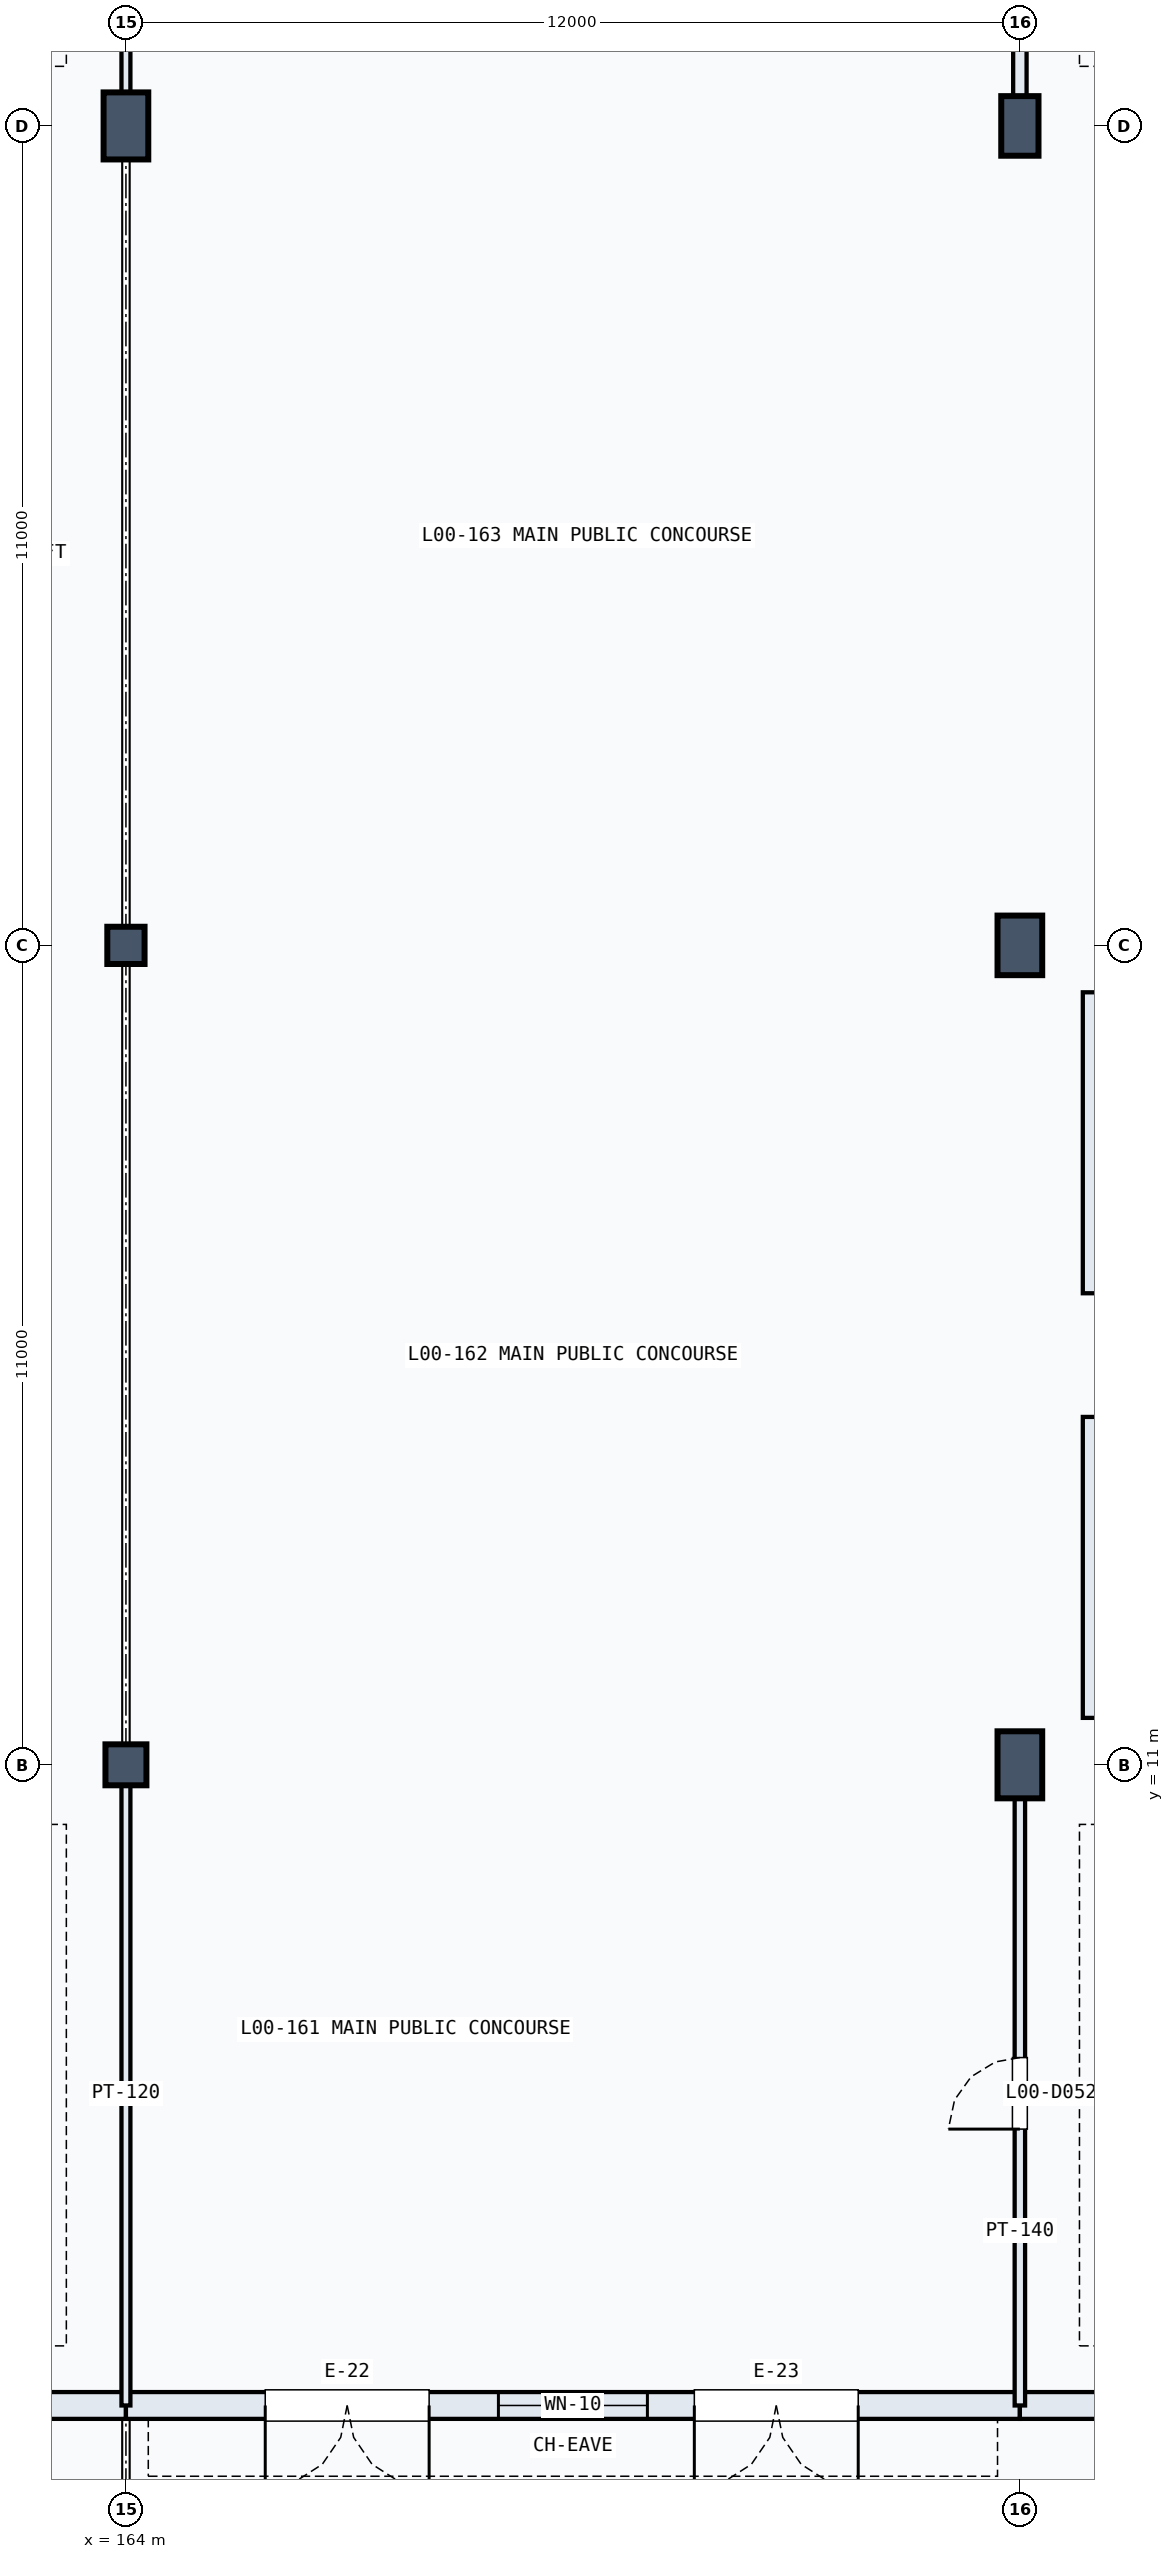
"""IFC4 building model, lengths in metres.
Left out: names, types, materials, properties, quantities, classifications, styles, units other than length and angle.
Written with IfcOpenShell. Run it as: python <this file> out.ifc"""

import sys

from ifc_helpers import new_model, si_unit, direction, frame, frame_2d, origin, origin_2d, place, context, subcontext, project, spatial, rectangle, extrude, element, fill, save


model = new_model("IFC4")
c1 = context("Model", 3, precision=1e-05, world=origin(), true_north=direction((0.0, 1.0)))
c2 = subcontext(c1, "Body", "Model", "MODEL_VIEW")
j1 = project(units=[si_unit("LENGTHUNIT", "METRE"), si_unit("PLANEANGLEUNIT", "RADIAN")], contexts=[c1])
p1 = place(None, origin())
s1 = spatial("IfcSite", under=j1, at=p1, CompositionType="ELEMENT")
p2 = place(p1, origin())
s2 = spatial("IfcBuilding", under=s1, at=p2, CompositionType="ELEMENT")
p3 = place(p2, origin())
s3 = spatial("IfcBuildingStorey", under=s2, at=p3, CompositionType="ELEMENT", Elevation=0.0)
p4 = place(p3, frame((164.0, 11.0, 0.0), z_axis=(0.0, 0.0, 1.0), x_axis=(1.0, 0.0, 0.0)))
e1 = element("IfcColumn", 1, at=p4, inside=s3, PredefinedType="COLUMN", context=c2, shape_type="SweptSolid", body=[
    extrude(rectangle(XDim=0.55, YDim=0.55, at=origin_2d()), origin(), (0.0, 0.0, 1.0), 5.4),
])
p5 = place(p3, frame((164.0, 22.0, 0.0), z_axis=(0.0, 0.0, 1.0), x_axis=(1.0, 0.0, 0.0)))
e2 = element("IfcColumn", 2, at=p5, inside=s3, PredefinedType="COLUMN", context=c2, shape_type="SweptSolid", body=[
    extrude(rectangle(XDim=0.5, YDim=0.5, at=origin_2d()), origin(), (0.0, 0.0, 1.0), 5.4),
])
for number, where, z_axis, x_axis in (
    (3, (164.0, 33.0, 0.0), (0.0, 0.0, 1.0), (1.0, 0.0, 0.0)),
    (4, (176.0, 11.0, 0.0), (0.0, 0.0, 1.0), (1.0, 0.0, 0.0)),
):
    element("IfcColumn", number, at=place(p3, frame(where, z_axis=z_axis, x_axis=x_axis)), inside=s3, PredefinedType="COLUMN", context=c2, shape_type="SweptSolid", body=[
        extrude(rectangle(XDim=0.6, YDim=0.9, at=origin_2d()), origin(), (0.0, 0.0, 1.0), 5.4),
    ])
p6 = place(p3, frame((176.0, 22.0, 0.0), z_axis=(0.0, 0.0, 1.0), x_axis=(1.0, 0.0, 0.0)))
e5 = element("IfcColumn", 5, at=p6, inside=s3, PredefinedType="COLUMN", context=c2, shape_type="SweptSolid", body=[
    extrude(rectangle(XDim=0.6, YDim=0.8, at=origin_2d()), origin(), (0.0, 0.0, 1.0), 5.4),
])
p7 = place(p3, frame((176.0, 33.0, 0.0), z_axis=(0.0, 0.0, 1.0), x_axis=(1.0, 0.0, 0.0)))
e6 = element("IfcColumn", 6, at=p7, inside=s3, PredefinedType="COLUMN", context=c2, shape_type="SweptSolid", body=[
    extrude(rectangle(XDim=0.5, YDim=0.8, at=origin_2d()), origin(), (0.0, 0.0, 1.0), 5.4),
])
p8 = place(p3, frame((152.0, 2.4, 0.0), z_axis=(0.0, 0.0, 1.0), x_axis=(1.0, 0.0, 0.0)))
e7 = element("IfcWall", 7, at=p8, inside=s3, PredefinedType="SOLIDWALL", context=c2, shape_type="SweptSolid", body=[
    extrude(rectangle(XDim=12.0, YDim=0.36, at=frame_2d((6.0, 0.0))), origin(), (0.0, 0.0, 1.0), 4.35),
])
p9 = place(p8, frame((1.87, 0.0, 0.0)))
e8 = element("IfcOpeningElement", 8, at=p9, cuts=e7, PredefinedType="OPENING", context=c2, shape_type="SweptSolid", body=[
    extrude(rectangle(XDim=2.2, YDim=2.35, at=frame_2d((1.1, 1.175))), frame((0.0, 0.19, 0.0), z_axis=(0.0, -1.0, 0.0), x_axis=(1.0, 0.0, 0.0)), (0.0, 0.0, 1.0), 0.38),
])
p10 = place(p8, frame((7.63, 0.0, 0.0)))
e9 = element("IfcOpeningElement", 9, at=p10, cuts=e7, PredefinedType="OPENING", context=c2, shape_type="SweptSolid", body=[
    extrude(rectangle(XDim=2.2, YDim=2.35, at=frame_2d((1.1, 1.175))), frame((0.0, 0.19, 0.0), z_axis=(0.0, -1.0, 0.0), x_axis=(1.0, 0.0, 0.0)), (0.0, 0.0, 1.0), 0.38),
])
p11 = place(p8, frame((5.55, 0.0, 0.8)))
e10 = element("IfcOpeningElement", 10, at=p11, cuts=e7, PredefinedType="OPENING", context=c2, shape_type="SweptSolid", body=[
    extrude(rectangle(XDim=0.9, YDim=1.8, at=frame_2d((0.45, 0.9))), frame((0.0, 0.19, 0.0), z_axis=(0.0, -1.0, 0.0), x_axis=(1.0, 0.0, 0.0)), (0.0, 0.0, 1.0), 0.38),
])
p12 = place(p3, frame((164.0, 2.4, 0.0), z_axis=(0.0, 0.0, 1.0), x_axis=(1.0, 0.0, 0.0)))
e11 = element("IfcWall", 11, at=p12, inside=s3, PredefinedType="SOLIDWALL", context=c2, shape_type="SweptSolid", body=[
    extrude(rectangle(XDim=12.0, YDim=0.36, at=frame_2d((6.0, 0.0))), origin(), (0.0, 0.0, 1.0), 4.43),
])
p13 = place(p12, frame((1.87, 0.0, 0.0)))
e12 = element("IfcOpeningElement", 12, at=p13, cuts=e11, PredefinedType="OPENING", context=c2, shape_type="SweptSolid", body=[
    extrude(rectangle(XDim=2.2, YDim=2.35, at=frame_2d((1.1, 1.175))), frame((0.0, 0.19, 0.0), z_axis=(0.0, -1.0, 0.0), x_axis=(1.0, 0.0, 0.0)), (0.0, 0.0, 1.0), 0.38),
])
p14 = place(p12, frame((7.63, 0.0, 0.0)))
e13 = element("IfcOpeningElement", 13, at=p14, cuts=e11, PredefinedType="OPENING", context=c2, shape_type="SweptSolid", body=[
    extrude(rectangle(XDim=2.2, YDim=2.35, at=frame_2d((1.1, 1.175))), frame((0.0, 0.19, 0.0), z_axis=(0.0, -1.0, 0.0), x_axis=(1.0, 0.0, 0.0)), (0.0, 0.0, 1.0), 0.38),
])
p15 = place(p12, frame((5.0, 0.0, 0.9)))
e14 = element("IfcOpeningElement", 14, at=p15, cuts=e11, PredefinedType="OPENING", context=c2, shape_type="SweptSolid", body=[
    extrude(rectangle(XDim=2.0, YDim=1.65, at=frame_2d((1.0, 0.825))), frame((0.0, 0.19, 0.0), z_axis=(0.0, -1.0, 0.0), x_axis=(1.0, 0.0, 0.0)), (0.0, 0.0, 1.0), 0.38),
])
p16 = place(p3, frame((176.0, 2.4, 0.0), z_axis=(0.0, 0.0, 1.0), x_axis=(1.0, 0.0, 0.0)))
e15 = element("IfcWall", 15, at=p16, inside=s3, PredefinedType="SOLIDWALL", context=c2, shape_type="SweptSolid", body=[
    extrude(rectangle(XDim=11.0, YDim=0.36, at=frame_2d((5.5, 0.0))), origin(), (0.0, 0.0, 1.0), 4.45),
])
p17 = place(p16, frame((4.1, 0.0, 0.95)))
e16 = element("IfcOpeningElement", 16, at=p17, cuts=e15, PredefinedType="OPENING", context=c2, shape_type="SweptSolid", body=[
    extrude(rectangle(XDim=2.8, YDim=1.5, at=frame_2d((1.4, 0.75))), frame((0.0, 0.19, 0.0), z_axis=(0.0, -1.0, 0.0), x_axis=(1.0, 0.0, 0.0)), (0.0, 0.0, 1.0), 0.38),
])
for number, where, z_axis, x_axis in (
    (17, (176.96, 11.63, 0.0), (0.0, 0.0, 1.0), (0.0, 1.0, 0.0)),
    (18, (176.96, 17.33, 0.0), (0.0, 0.0, 1.0), (0.0, 1.0, 0.0)),
):
    element("IfcWall", number, at=place(p3, frame(where, z_axis=z_axis, x_axis=x_axis)), inside=s3, PredefinedType="SOLIDWALL", context=c2, shape_type="SweptSolid", body=[
        extrude(rectangle(XDim=4.04, YDim=0.23, at=frame_2d((2.02, 0.0))), origin(), (0.0, 0.0, 1.0), 5.06),
    ])
p18 = place(p3, frame((164.0, 2.4, 0.0), z_axis=(0.0, 0.0, 1.0), x_axis=(0.0, 1.0, 0.0)))
e19 = element("IfcWall", 19, at=p18, inside=s3, PredefinedType="PARTITIONING", context=c2, shape_type="SweptSolid", body=[
    extrude(rectangle(XDim=8.38, YDim=0.12, at=frame_2d((4.19, 0.0))), origin(), (0.0, 0.0, 1.0), 4.35),
])
p19 = place(p3, frame((164.0, 33.22, 0.0), z_axis=(0.0, 0.0, 1.0), x_axis=(0.0, 1.0, 0.0)))
e20 = element("IfcWall", 20, at=p19, inside=s3, PredefinedType="PARTITIONING", context=c2, shape_type="SweptSolid", body=[
    extrude(rectangle(XDim=10.56, YDim=0.12, at=frame_2d((5.28, 0.0))), origin(), (0.0, 0.0, 1.0), 4.438),
])
p20 = place(p3, frame((176.0, 2.4, 0.0), z_axis=(0.0, 0.0, 1.0), x_axis=(0.0, 1.0, 0.0)))
e21 = element("IfcWall", 21, at=p20, inside=s3, PredefinedType="PARTITIONING", context=c2, shape_type="SweptSolid", body=[
    extrude(rectangle(XDim=8.38, YDim=0.14, at=frame_2d((4.19, 0.0))), origin(), (0.0, 0.0, 1.0), 4.366),
])
p21 = place(p20, frame((3.71, 0.0, 0.0)))
e22 = element("IfcOpeningElement", 22, at=p21, cuts=e21, PredefinedType="OPENING", context=c2, shape_type="SweptSolid", body=[
    extrude(rectangle(XDim=0.96, YDim=2.15, at=frame_2d((0.48, 1.075))), frame((0.0, 0.08, 0.0), z_axis=(0.0, -1.0, 0.0), x_axis=(1.0, 0.0, 0.0)), (0.0, 0.0, 1.0), 0.16),
])
p22 = place(p3, frame((176.0, 33.22, 0.0), z_axis=(0.0, 0.0, 1.0), x_axis=(0.0, 1.0, 0.0)))
e23 = element("IfcWall", 23, at=p22, inside=s3, PredefinedType="PARTITIONING", context=c2, shape_type="SweptSolid", body=[
    extrude(rectangle(XDim=10.56, YDim=0.18, at=frame_2d((5.28, 0.0))), origin(), (0.0, 0.0, 1.0), 4.1),
])
p23 = place(p22, frame((4.355, 0.0, 0.0)))
e24 = element("IfcOpeningElement", 24, at=p23, cuts=e23, PredefinedType="OPENING", context=c2, shape_type="SweptSolid", body=[
    extrude(rectangle(XDim=1.85, YDim=2.35, at=frame_2d((0.925, 1.175))), frame((0.0, 0.1, 0.0), z_axis=(0.0, -1.0, 0.0), x_axis=(1.0, 0.0, 0.0)), (0.0, 0.0, 1.0), 0.2),
])
p24 = place(p13, frame((2.2, 0.0, 0.0), z_axis=(0.0, 0.0, 1.0), x_axis=(-1.0, 0.0, 0.0)))
e25 = element("IfcDoor", 25, at=p24, inside=s3, OperationType="DOUBLE_DOOR_SINGLE_SWING", PredefinedType="DOOR", context=c2, shape_type="SweptSolid", body=[
    extrude(rectangle(XDim=2.2, YDim=2.35, at=frame_2d((1.1, 1.175))), frame((0.0, 0.025, 0.0), z_axis=(0.0, -1.0, 0.0), x_axis=(1.0, 0.0, 0.0)), (0.0, 0.0, 1.0), 0.05),
])
fill(e12, e25)
p25 = place(p14, frame((2.2, 0.0, 0.0), z_axis=(0.0, 0.0, 1.0), x_axis=(-1.0, 0.0, 0.0)))
e26 = element("IfcDoor", 26, at=p25, inside=s3, OperationType="DOUBLE_DOOR_SINGLE_SWING", PredefinedType="DOOR", context=c2, shape_type="SweptSolid", body=[
    extrude(rectangle(XDim=2.2, YDim=2.35, at=frame_2d((1.1, 1.175))), frame((0.0, 0.025, 0.0), z_axis=(0.0, -1.0, 0.0), x_axis=(1.0, 0.0, 0.0)), (0.0, 0.0, 1.0), 0.05),
])
fill(e13, e26)
p26 = place(p15, origin())
e27 = element("IfcWindow", 27, at=p26, inside=s3, PartitioningType="SINGLE_PANEL", PredefinedType="WINDOW", context=c2, shape_type="SweptSolid", body=[
    extrude(rectangle(XDim=2.0, YDim=1.65, at=frame_2d((1.0, 0.825))), frame((0.0, 0.03, 0.0), z_axis=(0.0, -1.0, 0.0), x_axis=(1.0, 0.0, 0.0)), (0.0, 0.0, 1.0), 0.06),
])
fill(e14, e27)
p27 = place(p21, origin())
e28 = element("IfcDoor", 28, at=p27, inside=s3, OperationType="SINGLE_SWING_LEFT", PredefinedType="DOOR", context=c2, shape_type="SweptSolid", body=[
    extrude(rectangle(XDim=0.96, YDim=2.15, at=frame_2d((0.48, 1.075))), frame((0.0, 0.025, 0.0), z_axis=(0.0, -1.0, 0.0), x_axis=(1.0, 0.0, 0.0)), (0.0, 0.0, 1.0), 0.05),
])
fill(e22, e28)
save(model, sys.argv[1])
